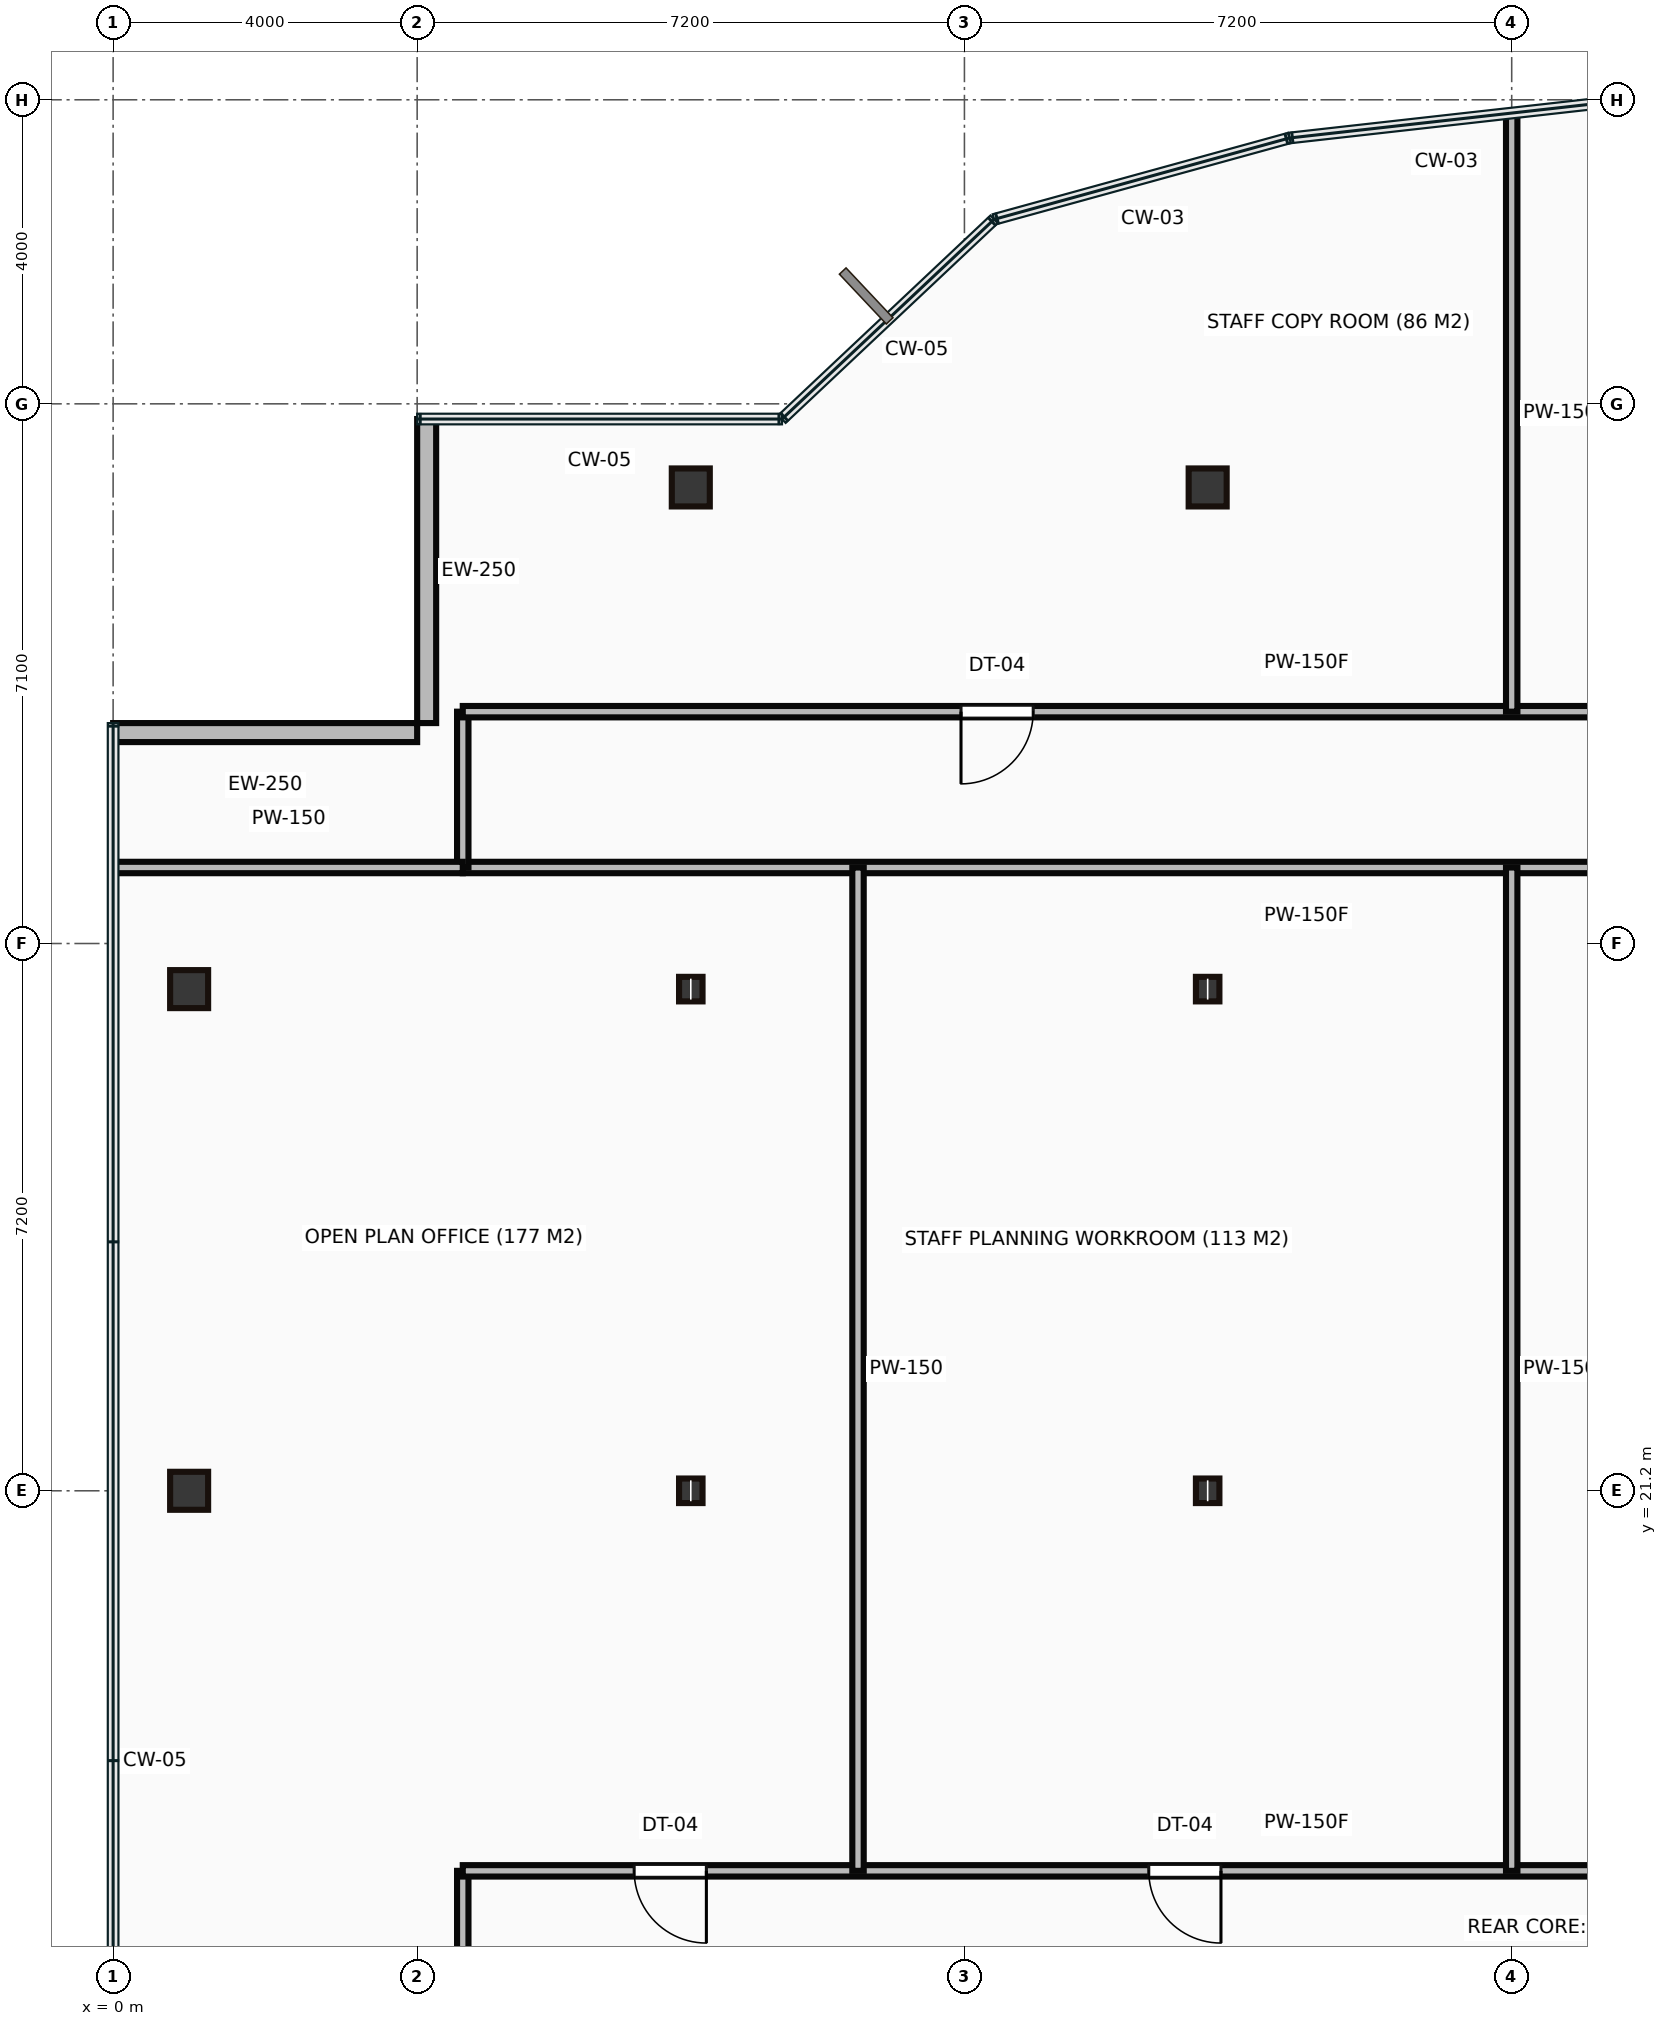
"""IFC4 building model, lengths in metres.
Left out: names, types, materials, properties, quantities, classifications, styles, units other than length and angle.
Written with IfcOpenShell. Run it as: python <this file> out.ifc"""

import sys

from ifc_helpers import new_model, si_unit, direction, frame, frame_2d, origin, origin_2d, place, context, subcontext, project, spatial, rectangle, hollow_rectangle, i_section, extrude, source, transform, mapped, element, fill, save


model = new_model("IFC4")
c1 = context("Model", 3, precision=1e-05, world=origin(), true_north=direction((0.0, 1.0)))
c2 = subcontext(c1, "Body", "Model", "MODEL_VIEW")
j1 = project(units=[si_unit("LENGTHUNIT", "METRE"), si_unit("PLANEANGLEUNIT", "RADIAN")], contexts=[c1])
p1 = place(None, origin())
s1 = spatial("IfcSite", under=j1, at=p1, CompositionType="ELEMENT")
p2 = place(p1, origin())
s2 = spatial("IfcBuilding", under=s1, at=p2, CompositionType="ELEMENT")
p3 = place(p2, frame((0.0, 0.0, 203.2)))
s3 = spatial("IfcBuildingStorey", under=s2, at=p3, CompositionType="ELEMENT", Elevation=203.2)
m1 = source(origin(), c2, "Body", "SweptSolid", [
    extrude(hollow_rectangle(XDim=0.5, YDim=0.5, WallThickness=0.022, at=origin_2d()), origin(), (0.0, 0.0, 1.0), 3.65),
])
for number, where, z_axis, x_axis in (
    (1, (1.0, 21.2, 0.0), (0.0, 0.0, 1.0), (1.0, 0.0, 0.0)),
    (2, (1.0, 27.8, 0.0), (0.0, 0.0, 1.0), (1.0, 0.0, 0.0)),
):
    element("IfcColumn", number, at=place(p3, frame(where, z_axis=z_axis, x_axis=x_axis)), inside=s3, PredefinedType="COLUMN", context=c2, shape_type="MappedRepresentation", body=[
        mapped(m1, transform((0.0, 0.0, 0.0))),
    ])
m2 = source(origin(), c2, "Body", "SweptSolid", [
    extrude(i_section(OverallWidth=0.309, OverallDepth=0.323, WebThickness=0.014, FlangeThickness=0.023, at=origin_2d()), origin(), (0.0, 0.0, 1.0), 3.65),
])
for number, where, z_axis, x_axis in (
    (3, (7.6, 21.2, 0.0), (0.0, 0.0, 1.0), (1.0, 0.0, 0.0)),
    (4, (7.6, 27.8, 0.0), (0.0, 0.0, 1.0), (1.0, 0.0, 0.0)),
):
    element("IfcColumn", number, at=place(p3, frame(where, z_axis=z_axis, x_axis=x_axis)), inside=s3, PredefinedType="COLUMN", context=c2, shape_type="MappedRepresentation", body=[
        mapped(m2, transform((0.0, 0.0, 0.0))),
    ])
p4 = place(p3, frame((7.6, 34.4, 0.0), z_axis=(0.0, 0.0, 1.0), x_axis=(1.0, 0.0, 0.0)))
e5 = element("IfcColumn", 5, at=p4, inside=s3, PredefinedType="COLUMN", context=c2, shape_type="MappedRepresentation", body=[
    mapped(m1, transform((0.0, 0.0, 0.0))),
])
for number, where, z_axis, x_axis in (
    (6, (14.4, 21.2, 0.0), (0.0, 0.0, 1.0), (1.0, 0.0, 0.0)),
    (7, (14.4, 27.8, 0.0), (0.0, 0.0, 1.0), (1.0, 0.0, 0.0)),
):
    element("IfcColumn", number, at=place(p3, frame(where, z_axis=z_axis, x_axis=x_axis)), inside=s3, PredefinedType="COLUMN", context=c2, shape_type="MappedRepresentation", body=[
        mapped(m2, transform((0.0, 0.0, 0.0))),
    ])
p5 = place(p3, frame((14.4, 34.4, 0.0), z_axis=(0.0, 0.0, 1.0), x_axis=(1.0, 0.0, 0.0)))
e8 = element("IfcColumn", 8, at=p5, inside=s3, PredefinedType="COLUMN", context=c2, shape_type="MappedRepresentation", body=[
    mapped(m1, transform((0.0, 0.0, 0.0))),
])
m3 = source(origin(), c2, "Body", "SweptSolid", [
    extrude(rectangle(XDim=4.0, YDim=0.25, at=frame_2d((2.0, 0.0))), origin(), (0.0, 0.0, 1.0), 3.4),
])
for number, where, z_axis, x_axis in (
    (9, (4.125, 35.3, 0.0), (0.0, 0.0, 1.0), (0.0, -1.0, 0.0)),
    (10, (4.0, 31.175, 0.0), (0.0, 0.0, 1.0), (-1.0, 0.0, 0.0)),
):
    element("IfcWall", number, at=place(p3, frame(where, z_axis=z_axis, x_axis=x_axis)), inside=s3, PredefinedType="STANDARD", context=c2, shape_type="MappedRepresentation", body=[
        mapped(m3, transform((0.0, 0.0, 0.0))),
    ])
m4 = source(origin(), c2, "Body", "SweptSolid", [
    extrude(rectangle(XDim=2.12, YDim=0.15, at=frame_2d((1.06, 0.0))), origin(), (0.0, 0.0, 1.0), 3.4),
])
p6 = place(p3, frame((4.6, 14.08, 0.0), z_axis=(0.0, 0.0, 1.0), x_axis=(0.0, 1.0, 0.0)))
e11 = element("IfcWall", 11, at=p6, inside=s3, PredefinedType="PARTITIONING", context=c2, shape_type="MappedRepresentation", body=[
    mapped(m4, transform((0.0, 0.0, 0.0))),
])
m5 = source(origin(), c2, "Body", "SweptSolid", [
    extrude(rectangle(XDim=22.2, YDim=0.15, at=frame_2d((11.1, 0.0))), origin(), (0.0, 0.0, 1.0), 3.4),
])
p7 = place(p3, frame((4.6, 16.2, 0.0), z_axis=(0.0, 0.0, 1.0), x_axis=(1.0, 0.0, 0.0)))
e12 = element("IfcWall", 12, at=p7, inside=s3, PredefinedType="PARTITIONING", context=c2, shape_type="MappedRepresentation", body=[
    mapped(m5, transform((0.0, 0.0, 0.0))),
])
p8 = place(p7, frame((2.255, 0.0, 0.0)))
e13 = element("IfcOpeningElement", 13, at=p8, cuts=e12, PredefinedType="OPENING", context=c2, shape_type="SweptSolid", body=[
    extrude(rectangle(XDim=0.95, YDim=2.15, at=frame_2d((0.475, 1.075))), frame((0.0, 0.085, 0.0), z_axis=(0.0, -1.0, 0.0), x_axis=(1.0, 0.0, 0.0)), (0.0, 0.0, 1.0), 0.17),
])
p9 = place(p7, frame((9.025, 0.0, 0.0)))
e14 = element("IfcOpeningElement", 14, at=p9, cuts=e12, PredefinedType="OPENING", context=c2, shape_type="SweptSolid", body=[
    extrude(rectangle(XDim=0.95, YDim=2.15, at=frame_2d((0.475, 1.075))), frame((0.0, 0.085, 0.0), z_axis=(0.0, -1.0, 0.0), x_axis=(1.0, 0.0, 0.0)), (0.0, 0.0, 1.0), 0.17),
])
p10 = place(p3, frame((26.8, 29.4, 0.0), z_axis=(0.0, 0.0, 1.0), x_axis=(-1.0, 0.0, 0.0)))
e15 = element("IfcWall", 15, at=p10, inside=s3, PredefinedType="PARTITIONING", context=c2, shape_type="MappedRepresentation", body=[
    mapped(m5, transform((0.0, 0.0, 0.0))),
])
m6 = source(origin(), c2, "Body", "SweptSolid", [
    extrude(rectangle(XDim=2.05, YDim=0.15, at=frame_2d((1.025, 0.0))), origin(), (0.0, 0.0, 1.0), 3.4),
])
p11 = place(p3, frame((4.6, 29.4, 0.0), z_axis=(0.0, 0.0, 1.0), x_axis=(0.0, 1.0, 0.0)))
e16 = element("IfcWall", 16, at=p11, inside=s3, PredefinedType="PARTITIONING", context=c2, shape_type="MappedRepresentation", body=[
    mapped(m6, transform((0.0, 0.0, 0.0))),
])
p12 = place(p3, frame((4.6, 31.45, 0.0), z_axis=(0.0, 0.0, 1.0), x_axis=(1.0, 0.0, 0.0)))
e17 = element("IfcWall", 17, at=p12, inside=s3, PredefinedType="PARTITIONING", context=c2, shape_type="MappedRepresentation", body=[
    mapped(m5, transform((0.0, 0.0, 0.0))),
])
p13 = place(p12, frame((6.555, 0.0, 0.0)))
e18 = element("IfcOpeningElement", 18, at=p13, cuts=e17, PredefinedType="OPENING", context=c2, shape_type="SweptSolid", body=[
    extrude(rectangle(XDim=0.95, YDim=2.15, at=frame_2d((0.475, 1.075))), frame((0.0, 0.085, 0.0), z_axis=(0.0, -1.0, 0.0), x_axis=(1.0, 0.0, 0.0)), (0.0, 0.0, 1.0), 0.17),
])
p14 = place(p12, frame((17.395, 0.0, 0.0)))
e19 = element("IfcOpeningElement", 19, at=p14, cuts=e17, PredefinedType="OPENING", context=c2, shape_type="SweptSolid", body=[
    extrude(rectangle(XDim=0.95, YDim=2.15, at=frame_2d((0.475, 1.075))), frame((0.0, 0.085, 0.0), z_axis=(0.0, -1.0, 0.0), x_axis=(1.0, 0.0, 0.0)), (0.0, 0.0, 1.0), 0.17),
])
m7 = source(origin(), c2, "Body", "SweptSolid", [
    extrude(rectangle(XDim=4.58, YDim=0.15, at=frame_2d((2.29, 0.0))), origin(), (0.0, 0.0, 1.0), 3.4),
])
p15 = place(p3, frame((0.02, 29.4, 0.0), z_axis=(0.0, 0.0, 1.0), x_axis=(1.0, 0.0, 0.0)))
e20 = element("IfcWall", 20, at=p15, inside=s3, PredefinedType="PARTITIONING", context=c2, shape_type="MappedRepresentation", body=[
    mapped(m7, transform((0.0, 0.0, 0.0))),
])
m8 = source(origin(), c2, "Body", "SweptSolid", [
    extrude(rectangle(XDim=13.2, YDim=0.15, at=frame_2d((6.6, 0.0))), origin(), (0.0, 0.0, 1.0), 3.4),
])
for number, where, z_axis, x_axis in (
    (21, (9.8, 29.4, 0.0), (0.0, 0.0, 1.0), (0.0, -1.0, 0.0)),
    (22, (18.4, 29.4, 0.0), (0.0, 0.0, 1.0), (0.0, -1.0, 0.0)),
):
    element("IfcWall", number, at=place(p3, frame(where, z_axis=z_axis, x_axis=x_axis)), inside=s3, PredefinedType="PARTITIONING", context=c2, shape_type="MappedRepresentation", body=[
        mapped(m8, transform((0.0, 0.0, 0.0))),
    ])
m9 = source(origin(), c2, "Body", "SweptSolid", [
    extrude(rectangle(XDim=7.855, YDim=0.15, at=frame_2d((3.928, 0.0))), origin(), (0.0, 0.0, 1.0), 3.4),
])
p16 = place(p3, frame((18.4, 39.305, 0.0), z_axis=(0.0, 0.0, 1.0), x_axis=(0.0, -1.0, 0.0)))
e23 = element("IfcWall", 23, at=p16, inside=s3, PredefinedType="PARTITIONING", context=c2, shape_type="MappedRepresentation", body=[
    mapped(m9, transform((0.0, 0.0, 0.0))),
])
m10 = source(origin(), c2, "Body", "SweptSolid", [
    extrude(rectangle(XDim=0.95, YDim=2.15, at=frame_2d((0.475, 1.075))), frame((0.0, 0.025, 0.0), z_axis=(0.0, -1.0, 0.0), x_axis=(1.0, 0.0, 0.0)), (0.0, 0.0, 1.0), 0.05),
])
p17 = place(p8, origin())
e24 = element("IfcDoor", 24, at=p17, inside=s3, OperationType="SINGLE_SWING_RIGHT", PredefinedType="DOOR", context=c2, shape_type="MappedRepresentation", body=[
    mapped(m10, transform((0.0, 0.0, 0.0))),
])
fill(e13, e24)
p18 = place(p13, origin())
e25 = element("IfcDoor", 25, at=p18, inside=s3, OperationType="SINGLE_SWING_LEFT", PredefinedType="DOOR", context=c2, shape_type="MappedRepresentation", body=[
    mapped(m10, transform((0.0, 0.0, 0.0))),
])
fill(e18, e25)
p19 = place(p9, origin())
e26 = element("IfcDoor", 26, at=p19, inside=s3, OperationType="SINGLE_SWING_RIGHT", PredefinedType="DOOR", context=c2, shape_type="MappedRepresentation", body=[
    mapped(m10, transform((0.0, 0.0, 0.0))),
])
fill(e14, e26)
save(model, sys.argv[1])
